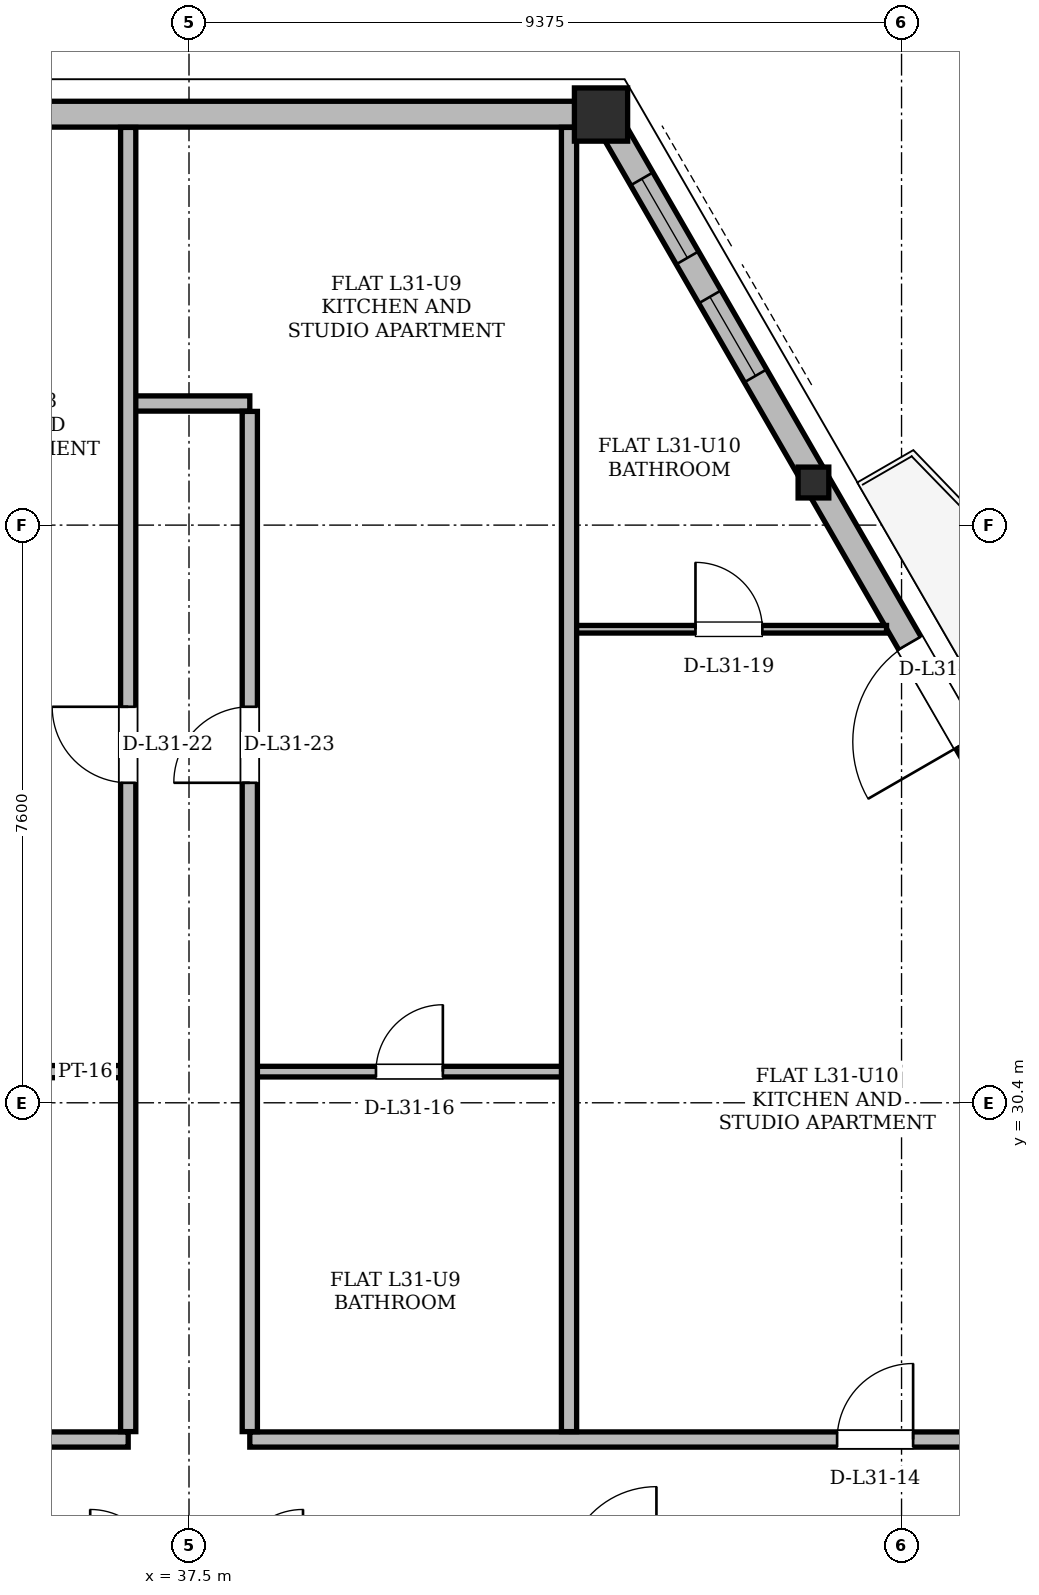
"""IFC4 building model, lengths in metres.
Left out: names, types, materials, properties, quantities, classifications, styles, units other than length and angle.
Written with IfcOpenShell. Run it as: python <this file> out.ifc"""

import sys

from ifc_helpers import new_model, si_unit, direction, frame, frame_2d, origin, origin_2d, place, context, subcontext, project, spatial, rectangle, hollow_rectangle, i_section, extrude, element, fill, save


model = new_model("IFC4")
c1 = context("Model", 3, precision=1e-05, world=origin(), true_north=direction((0.0, 1.0)))
c2 = subcontext(c1, "Body", "Model", "MODEL_VIEW")
j1 = project(units=[si_unit("LENGTHUNIT", "METRE"), si_unit("PLANEANGLEUNIT", "RADIAN")], contexts=[c1])
p1 = place(None, origin())
s1 = spatial("IfcSite", under=j1, at=p1, CompositionType="ELEMENT")
p2 = place(p1, origin())
s2 = spatial("IfcBuilding", under=s1, at=p2, CompositionType="ELEMENT")
p3 = place(p2, frame((0.0, 0.0, 119.4)))
s3 = spatial("IfcBuildingStorey", under=s2, at=p3, CompositionType="ELEMENT", Elevation=119.4)
p4 = place(p3, frame((42.966, 43.406, 0.005), z_axis=(-0.025146628722, -0.002582626734, 0.999680437491), x_axis=(0.102165304181, -0.994767435445, 0.0)))
e1 = element("IfcColumn", 1, at=p4, inside=s3, PredefinedType="COLUMN", context=c2, shape_type="SweptSolid", body=[
    extrude(hollow_rectangle(XDim=0.7, YDim=0.7, WallThickness=0.055, at=origin_2d()), origin(), (0.0, 0.0, 1.0), 3.592),
])
p5 = place(p3, frame((45.758, 38.57, 0.005), z_axis=(-0.023584088212, -0.005437253766, 0.999707070624), x_axis=(0.224654409911, -0.974438502989, 0.0)))
e2 = element("IfcColumn", 2, at=p5, inside=s3, PredefinedType="COLUMN", context=c2, shape_type="SweptSolid", body=[
    extrude(i_section(OverallWidth=0.404, OverallDepth=0.406, WebThickness=0.027, FlangeThickness=0.044, at=origin_2d()), origin(), (0.0, 0.0, 1.0), 3.592),
])
p6 = place(p3, frame((60.417, 13.181, 0.0), z_axis=(0.0, 0.0, 1.0), x_axis=(-0.499998569178, 0.866026229868, 0.0)))
e3 = element("IfcWall", 3, at=p6, inside=s3, PredefinedType="SOLIDWALL", context=c2, shape_type="SweptSolid", body=[
    extrude(rectangle(XDim=34.901, YDim=0.34, at=frame_2d((17.451, 0.0))), origin(), (0.0, 0.0, 1.0), 2.578),
])
p7 = place(p6, frame((6.369, 0.0, 0.0)))
e4 = element("IfcOpeningElement", 4, at=p7, cuts=e3, PredefinedType="OPENING", context=c2, shape_type="SweptSolid", body=[
    extrude(rectangle(XDim=1.5, YDim=2.2, at=frame_2d((0.75, 1.1))), frame((0.0, 0.17, 0.0), z_axis=(0.0, -1.0, 0.0), x_axis=(1.0, 0.0, 0.0)), (0.0, 0.0, 1.0), 0.34),
])
p8 = place(p6, frame((25.367, 0.0, 0.0)))
e5 = element("IfcOpeningElement", 5, at=p8, cuts=e3, PredefinedType="OPENING", context=c2, shape_type="SweptSolid", body=[
    extrude(rectangle(XDim=1.5, YDim=2.2, at=frame_2d((0.75, 1.1))), frame((0.0, 0.17, 0.0), z_axis=(0.0, -1.0, 0.0), x_axis=(1.0, 0.0, 0.0)), (0.0, 0.0, 1.0), 0.34),
])
p9 = place(p6, frame((3.309, 0.0, 0.85)))
e6 = element("IfcOpeningElement", 6, at=p9, cuts=e3, PredefinedType="OPENING", context=c2, shape_type="SweptSolid", body=[
    extrude(rectangle(XDim=1.2, YDim=1.48, at=frame_2d((0.6, 0.74))), frame((0.0, 0.17, 0.0), z_axis=(0.0, -1.0, 0.0), x_axis=(1.0, 0.0, 0.0)), (0.0, 0.0, 1.0), 0.34),
])
p10 = place(p6, frame((11.346, 0.0, 0.85)))
e7 = element("IfcOpeningElement", 7, at=p10, cuts=e3, PredefinedType="OPENING", context=c2, shape_type="SweptSolid", body=[
    extrude(rectangle(XDim=1.2, YDim=1.48, at=frame_2d((0.6, 0.74))), frame((0.0, 0.17, 0.0), z_axis=(0.0, -1.0, 0.0), x_axis=(1.0, 0.0, 0.0)), (0.0, 0.0, 1.0), 0.34),
])
p11 = place(p6, frame((32.719, 0.0, 0.85)))
e8 = element("IfcOpeningElement", 8, at=p11, cuts=e3, PredefinedType="OPENING", context=c2, shape_type="SweptSolid", body=[
    extrude(rectangle(XDim=1.2, YDim=1.48, at=frame_2d((0.6, 0.74))), frame((0.0, 0.17, 0.0), z_axis=(0.0, -1.0, 0.0), x_axis=(1.0, 0.0, 0.0)), (0.0, 0.0, 1.0), 0.34),
])
p12 = place(p6, frame((14.549, 0.0, 0.85)))
e9 = element("IfcOpeningElement", 9, at=p12, cuts=e3, PredefinedType="OPENING", context=c2, shape_type="SweptSolid", body=[
    extrude(rectangle(XDim=2.5, YDim=1.618, at=frame_2d((1.25, 0.809))), frame((0.0, 0.17, 0.0), z_axis=(0.0, -1.0, 0.0), x_axis=(1.0, 0.0, 0.0)), (0.0, 0.0, 1.0), 0.34),
])
p13 = place(p6, frame((20.967, 0.0, 0.85)))
e10 = element("IfcOpeningElement", 10, at=p13, cuts=e3, PredefinedType="OPENING", context=c2, shape_type="SweptSolid", body=[
    extrude(rectangle(XDim=2.4, YDim=1.618, at=frame_2d((1.2, 0.809))), frame((0.0, 0.17, 0.0), z_axis=(0.0, -1.0, 0.0), x_axis=(1.0, 0.0, 0.0)), (0.0, 0.0, 1.0), 0.34),
])
p14 = place(p6, frame((30.927, 0.0, 0.85)))
e11 = element("IfcOpeningElement", 11, at=p14, cuts=e3, PredefinedType="OPENING", context=c2, shape_type="SweptSolid", body=[
    extrude(rectangle(XDim=1.2, YDim=1.48, at=frame_2d((0.6, 0.74))), frame((0.0, 0.17, 0.0), z_axis=(0.0, -1.0, 0.0), x_axis=(1.0, 0.0, 0.0)), (0.0, 0.0, 1.0), 0.34),
])
p15 = place(p3, frame((42.966, 43.406, 0.0), z_axis=(0.0, 0.0, 1.0), x_axis=(-1.0, 0.0, 0.0)))
e12 = element("IfcWall", 12, at=p15, inside=s3, PredefinedType="SOLIDWALL", context=c2, shape_type="SweptSolid", body=[
    extrude(rectangle(XDim=10.932, YDim=0.34, at=frame_2d((5.466, 0.0))), origin(), (0.0, 0.0, 1.0), 2.578),
])
p16 = place(p3, frame((27.55, 25.97, 0.0), z_axis=(0.0, 0.0, 1.0), x_axis=(1.0, 0.0, 0.0)))
e13 = element("IfcWall", 13, at=p16, inside=s3, PredefinedType="PARTITIONING", context=c2, shape_type="SweptSolid", body=[
    extrude(rectangle(XDim=9.15, YDim=0.2, at=frame_2d((4.575, 0.0))), origin(), (0.0, 0.0, 1.0), 2.814),
])
p17 = place(p16, frame((2.173, 0.0, 0.0)))
e14 = element("IfcOpeningElement", 14, at=p17, cuts=e13, PredefinedType="OPENING", context=c2, shape_type="SweptSolid", body=[
    extrude(rectangle(XDim=1.0, YDim=2.18, at=frame_2d((0.5, 1.09))), frame((0.0, 0.1, 0.0), z_axis=(0.0, -1.0, 0.0), x_axis=(1.0, 0.0, 0.0)), (0.0, 0.0, 1.0), 0.2),
])
p18 = place(p3, frame((38.3, 25.97, 0.0), z_axis=(0.0, 0.0, 1.0), x_axis=(1.0, 0.0, 0.0)))
e15 = element("IfcWall", 15, at=p18, inside=s3, PredefinedType="PARTITIONING", context=c2, shape_type="SweptSolid", body=[
    extrude(rectangle(XDim=11.7, YDim=0.2, at=frame_2d((5.85, 0.0))), origin(), (0.0, 0.0, 1.0), 2.814),
])
p19 = place(p18, frame((7.727, 0.0, 0.0)))
e16 = element("IfcOpeningElement", 16, at=p19, cuts=e15, PredefinedType="OPENING", context=c2, shape_type="SweptSolid", body=[
    extrude(rectangle(XDim=1.0, YDim=2.18, at=frame_2d((0.5, 1.09))), frame((0.0, 0.1, 0.0), z_axis=(0.0, -1.0, 0.0), x_axis=(1.0, 0.0, 0.0)), (0.0, 0.0, 1.0), 0.2),
])
p20 = place(p3, frame((32.918, 30.81, 0.0), z_axis=(0.0, 0.0, 1.0), x_axis=(1.0, 0.0, 0.0)))
e17 = element("IfcWall", 17, at=p20, inside=s3, PredefinedType="PARTITIONING", context=c2, shape_type="SweptSolid", body=[
    extrude(rectangle(XDim=3.864, YDim=0.16, at=frame_2d((1.932, 0.0))), origin(), (0.0, 0.0, 1.0), 3.36),
])
p21 = place(p20, frame((1.492, 0.0, 0.0)))
e18 = element("IfcOpeningElement", 18, at=p21, cuts=e17, PredefinedType="OPENING", context=c2, shape_type="SweptSolid", body=[
    extrude(rectangle(XDim=0.88, YDim=2.08, at=frame_2d((0.44, 1.04))), frame((0.0, 0.08, 0.0), z_axis=(0.0, -1.0, 0.0), x_axis=(1.0, 0.0, 0.0)), (0.0, 0.0, 1.0), 0.16),
])
p22 = place(p3, frame((38.218, 30.81, 0.0), z_axis=(0.0, 0.0, 1.0), x_axis=(1.0, 0.0, 0.0)))
e19 = element("IfcWall", 19, at=p22, inside=s3, PredefinedType="PARTITIONING", context=c2, shape_type="SweptSolid", body=[
    extrude(rectangle(XDim=4.364, YDim=0.14, at=frame_2d((2.182, 0.0))), origin(), (0.0, 0.0, 1.0), 3.36),
])
p23 = place(p22, frame((1.742, 0.0, 0.0)))
e20 = element("IfcOpeningElement", 20, at=p23, cuts=e19, PredefinedType="OPENING", context=c2, shape_type="SweptSolid", body=[
    extrude(rectangle(XDim=0.88, YDim=2.08, at=frame_2d((0.44, 1.04))), frame((0.0, 0.07, 0.0), z_axis=(0.0, -1.0, 0.0), x_axis=(1.0, 0.0, 0.0)), (0.0, 0.0, 1.0), 0.14),
])
p24 = place(p3, frame((42.418, 36.63, 0.0), z_axis=(0.0, 0.0, 1.0), x_axis=(1.0, 0.0, 0.0)))
e21 = element("IfcWall", 21, at=p24, inside=s3, PredefinedType="PARTITIONING", context=c2, shape_type="SweptSolid", body=[
    extrude(rectangle(XDim=4.26, YDim=0.1, at=frame_2d((2.13, 0.0))), origin(), (0.0, 0.0, 1.0), 2.814),
])
p25 = place(p24, frame((1.746, 0.0, 0.0)))
e22 = element("IfcOpeningElement", 22, at=p25, cuts=e21, PredefinedType="OPENING", context=c2, shape_type="SweptSolid", body=[
    extrude(rectangle(XDim=0.88, YDim=2.08, at=frame_2d((0.44, 1.04))), frame((0.0, 0.05, 0.0), z_axis=(0.0, -1.0, 0.0), x_axis=(1.0, 0.0, 0.0)), (0.0, 0.0, 1.0), 0.1),
])
p26 = place(p3, frame((36.7, 39.6, 0.0), z_axis=(0.0, 0.0, 1.0), x_axis=(1.0, 0.0, 0.0)))
e23 = element("IfcWall", 23, at=p26, inside=s3, PredefinedType="PARTITIONING", context=c2, shape_type="SweptSolid", body=[
    extrude(rectangle(XDim=1.6, YDim=0.2, at=frame_2d((0.8, 0.0))), origin(), (0.0, 0.0, 1.0), 3.36),
])
p27 = place(p3, frame((36.7, 26.074, 0.0), z_axis=(0.0, 0.0, 1.0), x_axis=(0.0, 1.0, 0.0)))
e24 = element("IfcWall", 24, at=p27, inside=s3, PredefinedType="PARTITIONING", context=c2, shape_type="SweptSolid", body=[
    extrude(rectangle(XDim=17.158, YDim=0.2, at=frame_2d((8.579, 0.0))), origin(), (0.0, 0.0, 1.0), 3.36),
])
p28 = place(p27, frame((8.536, 0.0, 0.0)))
e25 = element("IfcOpeningElement", 25, at=p28, cuts=e24, PredefinedType="OPENING", context=c2, shape_type="SweptSolid", body=[
    extrude(rectangle(XDim=1.0, YDim=2.18, at=frame_2d((0.5, 1.09))), frame((0.0, 0.1, 0.0), z_axis=(0.0, -1.0, 0.0), x_axis=(1.0, 0.0, 0.0)), (0.0, 0.0, 1.0), 0.2),
])
p29 = place(p3, frame((38.3, 26.074, 0.0), z_axis=(0.0, 0.0, 1.0), x_axis=(0.0, 1.0, 0.0)))
e26 = element("IfcWall", 26, at=p29, inside=s3, PredefinedType="PARTITIONING", context=c2, shape_type="SweptSolid", body=[
    extrude(rectangle(XDim=13.422, YDim=0.2, at=frame_2d((6.711, 0.0))), origin(), (0.0, 0.0, 1.0), 3.36),
])
p30 = place(p29, frame((8.536, 0.0, 0.0)))
e27 = element("IfcOpeningElement", 27, at=p30, cuts=e26, PredefinedType="OPENING", context=c2, shape_type="SweptSolid", body=[
    extrude(rectangle(XDim=1.0, YDim=2.18, at=frame_2d((0.5, 1.09))), frame((0.0, 0.1, 0.0), z_axis=(0.0, -1.0, 0.0), x_axis=(1.0, 0.0, 0.0)), (0.0, 0.0, 1.0), 0.2),
])
p31 = place(p3, frame((42.5, 26.074, 0.0), z_axis=(0.0, 0.0, 1.0), x_axis=(0.0, 1.0, 0.0)))
e28 = element("IfcWall", 28, at=p31, inside=s3, PredefinedType="PARTITIONING", context=c2, shape_type="SweptSolid", body=[
    extrude(rectangle(XDim=17.158, YDim=0.2, at=frame_2d((8.579, 0.0))), origin(), (0.0, 0.0, 1.0), 3.36),
])
p32 = place(p8, origin())
e29 = element("IfcDoor", 29, at=p32, inside=s3, OperationType="SINGLE_SWING_LEFT", PredefinedType="DOOR", context=c2, shape_type="SweptSolid", body=[
    extrude(rectangle(XDim=1.5, YDim=2.2, at=frame_2d((0.75, 1.1))), frame((0.0, 0.025, 0.0), z_axis=(0.0, -1.0, 0.0), x_axis=(1.0, 0.0, 0.0)), (0.0, 0.0, 1.0), 0.05),
])
fill(e5, e29)
p33 = place(p11, origin())
e30 = element("IfcWindow", 30, at=p33, inside=s3, PartitioningType="SINGLE_PANEL", PredefinedType="WINDOW", context=c2, shape_type="SweptSolid", body=[
    extrude(rectangle(XDim=1.2, YDim=1.48, at=frame_2d((0.6, 0.74))), frame((0.0, 0.03, 0.0), z_axis=(0.0, -1.0, 0.0), x_axis=(1.0, 0.0, 0.0)), (0.0, 0.0, 1.0), 0.06),
])
fill(e8, e30)
p34 = place(p14, origin())
e31 = element("IfcWindow", 31, at=p34, inside=s3, PartitioningType="SINGLE_PANEL", PredefinedType="WINDOW", context=c2, shape_type="SweptSolid", body=[
    extrude(rectangle(XDim=1.2, YDim=1.48, at=frame_2d((0.6, 0.74))), frame((0.0, 0.03, 0.0), z_axis=(0.0, -1.0, 0.0), x_axis=(1.0, 0.0, 0.0)), (0.0, 0.0, 1.0), 0.06),
])
fill(e11, e31)
p35 = place(p19, origin())
e32 = element("IfcDoor", 32, at=p35, inside=s3, OperationType="SINGLE_SWING_RIGHT", PredefinedType="DOOR", context=c2, shape_type="SweptSolid", body=[
    extrude(rectangle(XDim=1.0, YDim=2.18, at=frame_2d((0.5, 1.09))), frame((0.0, 0.025, 0.0), z_axis=(0.0, -1.0, 0.0), x_axis=(1.0, 0.0, 0.0)), (0.0, 0.0, 1.0), 0.05),
])
fill(e16, e32)
p36 = place(p23, origin())
e33 = element("IfcDoor", 33, at=p36, inside=s3, OperationType="SINGLE_SWING_RIGHT", PredefinedType="DOOR", context=c2, shape_type="SweptSolid", body=[
    extrude(rectangle(XDim=0.88, YDim=2.08, at=frame_2d((0.44, 1.04))), frame((0.0, 0.025, 0.0), z_axis=(0.0, -1.0, 0.0), x_axis=(1.0, 0.0, 0.0)), (0.0, 0.0, 1.0), 0.05),
])
fill(e20, e33)
p37 = place(p25, origin())
e34 = element("IfcDoor", 34, at=p37, inside=s3, OperationType="SINGLE_SWING_LEFT", PredefinedType="DOOR", context=c2, shape_type="SweptSolid", body=[
    extrude(rectangle(XDim=0.88, YDim=2.08, at=frame_2d((0.44, 1.04))), frame((0.0, 0.025, 0.0), z_axis=(0.0, -1.0, 0.0), x_axis=(1.0, 0.0, 0.0)), (0.0, 0.0, 1.0), 0.05),
])
fill(e22, e34)
p38 = place(p28, origin())
e35 = element("IfcDoor", 35, at=p38, inside=s3, OperationType="SINGLE_SWING_RIGHT", PredefinedType="DOOR", context=c2, shape_type="SweptSolid", body=[
    extrude(rectangle(XDim=1.0, YDim=2.18, at=frame_2d((0.5, 1.09))), frame((0.0, 0.025, 0.0), z_axis=(0.0, -1.0, 0.0), x_axis=(1.0, 0.0, 0.0)), (0.0, 0.0, 1.0), 0.05),
])
fill(e25, e35)
p39 = place(p30, origin())
e36 = element("IfcDoor", 36, at=p39, inside=s3, OperationType="SINGLE_SWING_LEFT", PredefinedType="DOOR", context=c2, shape_type="SweptSolid", body=[
    extrude(rectangle(XDim=1.0, YDim=2.18, at=frame_2d((0.5, 1.09))), frame((0.0, 0.025, 0.0), z_axis=(0.0, -1.0, 0.0), x_axis=(1.0, 0.0, 0.0)), (0.0, 0.0, 1.0), 0.05),
])
fill(e27, e36)
save(model, sys.argv[1])
